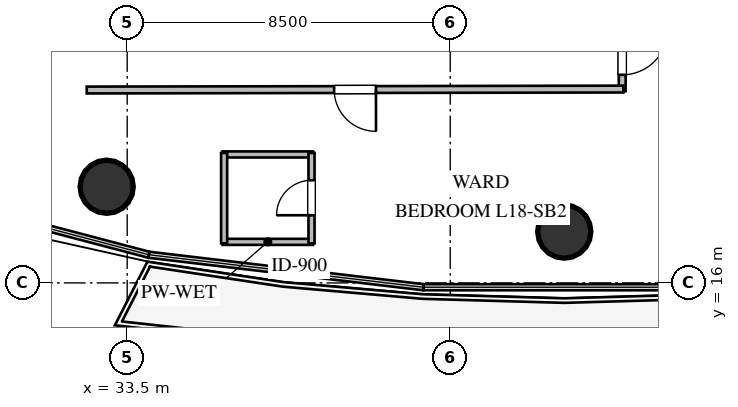
"""IFC4 building model, lengths in metres.
Left out: names, types, materials, properties, quantities, classifications, styles, units other than length and angle.
Written with IfcOpenShell. Run it as: python <this file> out.ifc"""

import sys

from ifc_helpers import new_model, si_unit, direction, frame, frame_2d, origin, origin_2d, place, context, subcontext, project, spatial, rectangle, circle, extrude, element, fill, save


model = new_model("IFC4")
c1 = context("Model", 3, precision=1e-05, world=origin(), true_north=direction((0.0, 1.0)))
c2 = subcontext(c1, "Body", "Model", "MODEL_VIEW")
j1 = project(units=[si_unit("LENGTHUNIT", "METRE"), si_unit("PLANEANGLEUNIT", "RADIAN")], contexts=[c1])
p1 = place(None, origin())
s1 = spatial("IfcSite", under=j1, at=p1, CompositionType="ELEMENT")
p2 = place(p1, origin())
s2 = spatial("IfcBuilding", under=s1, at=p2, CompositionType="ELEMENT")
p3 = place(p2, frame((0.0, 0.0, 70.8)))
s3 = spatial("IfcBuildingStorey", under=s2, at=p3, CompositionType="ELEMENT", Elevation=70.8)
for number, where, z_axis, x_axis in (
    (1, (32.96, 18.53, 0.0), (0.0, 0.0, 1.0), (1.0, 0.0, 0.0)),
    (2, (45.0, 17.35, 0.0), (0.0, 0.0, 1.0), (1.0, 0.0, 0.0)),
):
    element("IfcColumn", number, at=place(p3, frame(where, z_axis=z_axis, x_axis=x_axis)), inside=s3, PredefinedType="COLUMN", context=c2, shape_type="SweptSolid", body=[
        extrude(circle(Radius=0.7, at=origin_2d()), origin(), (0.0, 0.0, 1.0), 3.6),
    ])
for number, where, z_axis, x_axis in (
    (3, (36.01, 17.08, 0.0), (0.0, 0.0, 1.0), (1.0, 0.0, 0.0)),
    (4, (36.01, 19.38, 0.0), (0.0, 0.0, 1.0), (1.0, 0.0, 0.0)),
    (5, (36.05, 17.04, 0.0), (0.0, 0.0, 1.0), (0.0, 1.0, 0.0)),
):
    element("IfcWall", number, at=place(p3, frame(where, z_axis=z_axis, x_axis=x_axis)), inside=s3, PredefinedType="PLUMBINGWALL", context=c2, shape_type="SweptSolid", body=[
        extrude(rectangle(XDim=2.38, YDim=0.16, at=frame_2d((1.19, 0.0))), origin(), (0.0, 0.0, 1.0), 3.36),
    ])
p4 = place(p3, frame((38.35, 17.04, 0.0), z_axis=(0.0, 0.0, 1.0), x_axis=(0.0, 1.0, 0.0)))
e6 = element("IfcWall", 6, at=p4, inside=s3, PredefinedType="PLUMBINGWALL", context=c2, shape_type="SweptSolid", body=[
    extrude(rectangle(XDim=2.38, YDim=0.16, at=frame_2d((1.19, 0.0))), origin(), (0.0, 0.0, 1.0), 3.36),
])
p5 = place(p4, frame((0.74, 0.0, 0.0)))
e7 = element("IfcOpeningElement", 7, at=p5, cuts=e6, PredefinedType="OPENING", context=c2, shape_type="SweptSolid", body=[
    extrude(rectangle(XDim=0.92, YDim=2.1, at=frame_2d((0.46, 1.05))), frame((0.0, 0.09, 0.0), z_axis=(0.0, -1.0, 0.0), x_axis=(1.0, 0.0, 0.0)), (0.0, 0.0, 1.0), 0.18),
])
p6 = place(p3, frame((46.525, 23.105, 0.0), z_axis=(0.0, 0.0, 1.0), x_axis=(0.0, -1.0, 0.0)))
e8 = element("IfcWall", 8, at=p6, inside=s3, PredefinedType="PARTITIONING", context=c2, shape_type="SweptSolid", body=[
    extrude(rectangle(XDim=2.06, YDim=0.18, at=frame_2d((1.03, 0.0))), origin(), (0.0, 0.0, 1.0), 3.36),
])
p7 = place(p6, frame((0.43, 0.0, 0.0)))
e9 = element("IfcOpeningElement", 9, at=p7, cuts=e8, PredefinedType="OPENING", context=c2, shape_type="SweptSolid", body=[
    extrude(rectangle(XDim=1.2, YDim=2.15, at=frame_2d((0.6, 1.075))), frame((0.0, 0.1, 0.0), z_axis=(0.0, -1.0, 0.0), x_axis=(1.0, 0.0, 0.0)), (0.0, 0.0, 1.0), 0.2),
])
p8 = place(p3, frame((46.555, 21.1, 0.0), z_axis=(0.0, 0.0, 1.0), x_axis=(-0.999998414151, -0.001780925679, 0.0)))
e10 = element("IfcWall", 10, at=p8, inside=s3, PredefinedType="PARTITIONING", context=c2, shape_type="SweptSolid", body=[
    extrude(rectangle(XDim=14.12, YDim=0.18, at=frame_2d((7.06, 0.0))), origin(), (0.0, 0.0, 1.0), 2.996),
])
p9 = place(p8, frame((6.51, 0.0, 0.0)))
e11 = element("IfcOpeningElement", 11, at=p9, cuts=e10, PredefinedType="OPENING", context=c2, shape_type="SweptSolid", body=[
    extrude(rectangle(XDim=1.1, YDim=2.1, at=frame_2d((0.55, 1.05))), frame((0.0, 0.1, 0.0), z_axis=(0.0, -1.0, 0.0), x_axis=(1.0, 0.0, 0.0)), (0.0, 0.0, 1.0), 0.2),
])
p10 = place(p5, origin())
e12 = element("IfcDoor", 12, at=p10, inside=s3, OperationType="SINGLE_SWING_LEFT", PredefinedType="DOOR", context=c2, shape_type="SweptSolid", body=[
    extrude(rectangle(XDim=0.92, YDim=2.1, at=frame_2d((0.46, 1.05))), frame((0.0, 0.025, 0.0), z_axis=(0.0, -1.0, 0.0), x_axis=(1.0, 0.0, 0.0)), (0.0, 0.0, 1.0), 0.05),
])
fill(e7, e12)
p11 = place(p7, origin())
e13 = element("IfcDoor", 13, at=p11, inside=s3, OperationType="SINGLE_SWING_LEFT", PredefinedType="DOOR", context=c2, shape_type="SweptSolid", body=[
    extrude(rectangle(XDim=1.2, YDim=2.15, at=frame_2d((0.6, 1.075))), frame((0.0, 0.025, 0.0), z_axis=(0.0, -1.0, 0.0), x_axis=(1.0, 0.0, 0.0)), (0.0, 0.0, 1.0), 0.05),
])
fill(e9, e13)
p12 = place(p9, origin())
e14 = element("IfcDoor", 14, at=p12, inside=s3, OperationType="SINGLE_SWING_LEFT", PredefinedType="DOOR", context=c2, shape_type="SweptSolid", body=[
    extrude(rectangle(XDim=1.1, YDim=2.1, at=frame_2d((0.55, 1.05))), frame((0.0, 0.025, 0.0), z_axis=(0.0, -1.0, 0.0), x_axis=(1.0, 0.0, 0.0)), (0.0, 0.0, 1.0), 0.05),
])
fill(e11, e14)
save(model, sys.argv[1])
